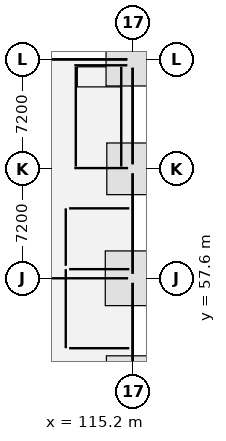
"""IFC4 building model, lengths in metres.
Left out: names, types, materials, properties, quantities, classifications, styles, units other than length and angle.
Written with IfcOpenShell. Run it as: python <this file> out.ifc"""

import sys

from ifc_helpers import new_model, si_unit, direction, frame, frame_2d, origin, origin_2d, place, context, subcontext, project, spatial, rectangle, extrude, element, fill, save


model = new_model("IFC4")
c1 = context("Model", 3, precision=1e-05, world=origin(), true_north=direction((0.0, 1.0)))
c2 = subcontext(c1, "Body", "Model", "MODEL_VIEW")
j1 = project(units=[si_unit("LENGTHUNIT", "METRE"), si_unit("PLANEANGLEUNIT", "RADIAN")], contexts=[c1])
p1 = place(None, origin())
s1 = spatial("IfcSite", under=j1, at=p1, CompositionType="ELEMENT")
p2 = place(p1, origin())
s2 = spatial("IfcBuilding", under=s1, at=p2, CompositionType="ELEMENT")
p3 = place(p2, origin())
s3 = spatial("IfcBuildingStorey", under=s2, at=p3, CompositionType="ELEMENT", Elevation=0.0)
for number, where, z_axis, x_axis in (
    (1, (115.2, 57.6, 0.0), (0.0, 0.0, 1.0), (1.0, 0.0, 0.0)),
    (2, (115.2, 64.8, 0.0), (0.0, 0.0, 1.0), (1.0, 0.0, 0.0)),
):
    element("IfcColumn", number, at=place(p3, frame(where, z_axis=z_axis, x_axis=x_axis)), inside=s3, PredefinedType="COLUMN", context=c2, shape_type="SweptSolid", body=[
        extrude(rectangle(XDim=0.6, YDim=0.6, at=origin_2d()), origin(), (0.0, 0.0, 1.0), 5.4),
    ])
p4 = place(p3, frame((115.2, 72.0, 0.0), z_axis=(0.0, 0.0, 1.0), x_axis=(1.0, 0.0, 0.0)))
e3 = element("IfcColumn", 3, at=p4, inside=s3, PredefinedType="PILASTER", context=c2, shape_type="SweptSolid", body=[
    extrude(rectangle(XDim=0.7, YDim=1.1, at=origin_2d()), origin(), (0.0, 0.0, 1.0), 5.4),
])
p5 = place(p3, frame((111.36, 64.85, 0.0), z_axis=(0.0, 0.0, 1.0), x_axis=(1.0, 0.0, 0.0)))
e4 = element("IfcWall", 4, at=p5, inside=s3, PredefinedType="SHEAR", context=c2, shape_type="SweptSolid", body=[
    extrude(rectangle(XDim=3.54, YDim=0.2, at=frame_2d((1.77, 0.0))), origin(), (0.0, 0.0, 1.0), 4.95),
])
p6 = place(p5, frame((1.22, 0.0, 0.0)))
e5 = element("IfcOpeningElement", 5, at=p6, cuts=e4, PredefinedType="OPENING", context=c2, shape_type="SweptSolid", body=[
    extrude(rectangle(XDim=1.1, YDim=2.15, at=frame_2d((0.55, 1.075))), frame((0.0, 0.112, 0.0), z_axis=(0.0, -1.0, 0.0), x_axis=(1.0, 0.0, 0.0)), (0.0, 0.0, 1.0), 0.224),
])
p7 = place(p3, frame((111.36, 71.61, 0.0), z_axis=(0.0, 0.0, 1.0), x_axis=(1.0, 0.0, 0.0)))
e6 = element("IfcWall", 6, at=p7, inside=s3, PredefinedType="SHEAR", context=c2, shape_type="SweptSolid", body=[
    extrude(rectangle(XDim=3.49, YDim=0.2, at=frame_2d((1.745, 0.0))), origin(), (0.0, 0.0, 1.0), 4.95),
])
for number, where, z_axis, x_axis in (
    (7, (111.46, 64.95, 0.0), (0.0, 0.0, 1.0), (0.0, 1.0, 0.0)),
    (8, (114.45, 64.95, 0.0), (0.0, 0.0, 1.0), (0.0, 1.0, 0.0)),
):
    element("IfcWall", number, at=place(p3, frame(where, z_axis=z_axis, x_axis=x_axis)), inside=s3, PredefinedType="SHEAR", context=c2, shape_type="SweptSolid", body=[
        extrude(rectangle(XDim=6.56, YDim=0.2, at=frame_2d((3.28, 0.0))), origin(), (0.0, 0.0, 1.0), 4.95),
    ])
p8 = place(p3, frame((115.2, 50.7, 0.0), z_axis=(0.0, 0.0, 1.0), x_axis=(0.0, 1.0, 0.0)))
e9 = element("IfcWall", 9, at=p8, inside=s3, PredefinedType="ELEMENTEDWALL", context=c2, shape_type="SweptSolid", body=[
    extrude(rectangle(XDim=6.6, YDim=0.32, at=frame_2d((3.3, 0.0))), origin(), (0.0, 0.0, 1.0), 4.29),
])
p9 = place(p8, frame((0.2, 0.0, 0.0)))
e10 = element("IfcOpeningElement", 10, at=p9, cuts=e9, PredefinedType="OPENING", context=c2, shape_type="SweptSolid", body=[
    extrude(rectangle(XDim=1.1, YDim=2.15, at=frame_2d((0.55, 1.075))), frame((0.0, 0.172, 0.0), z_axis=(0.0, -1.0, 0.0), x_axis=(1.0, 0.0, 0.0)), (0.0, 0.0, 1.0), 0.344),
])
p10 = place(p3, frame((115.2, 57.9, 0.0), z_axis=(0.0, 0.0, 1.0), x_axis=(0.0, 1.0, 0.0)))
e11 = element("IfcWall", 11, at=p10, inside=s3, PredefinedType="ELEMENTEDWALL", context=c2, shape_type="SweptSolid", body=[
    extrude(rectangle(XDim=6.6, YDim=0.32, at=frame_2d((3.3, 0.0))), origin(), (0.0, 0.0, 1.0), 4.34),
])
p11 = place(p10, frame((2.85, 0.0, 0.85)))
e12 = element("IfcOpeningElement", 12, at=p11, cuts=e11, PredefinedType="OPENING", context=c2, shape_type="SweptSolid", body=[
    extrude(rectangle(XDim=0.9, YDim=2.0, at=frame_2d((0.45, 1.0))), frame((0.0, 0.172, 0.0), z_axis=(0.0, -1.0, 0.0), x_axis=(1.0, 0.0, 0.0)), (0.0, 0.0, 1.0), 0.344),
])
p12 = place(p10, frame((5.3, 0.0, 0.0)))
e13 = element("IfcOpeningElement", 13, at=p12, cuts=e11, PredefinedType="OPENING", context=c2, shape_type="SweptSolid", body=[
    extrude(rectangle(XDim=1.1, YDim=2.15, at=frame_2d((0.55, 1.075))), frame((0.0, 0.172, 0.0), z_axis=(0.0, -1.0, 0.0), x_axis=(1.0, 0.0, 0.0)), (0.0, 0.0, 1.0), 0.344),
])
p13 = place(p3, frame((115.2, 65.1, 0.0), z_axis=(0.0, 0.0, 1.0), x_axis=(0.0, 1.0, 0.0)))
e14 = element("IfcWall", 14, at=p13, inside=s3, PredefinedType="ELEMENTEDWALL", context=c2, shape_type="SweptSolid", body=[
    extrude(rectangle(XDim=6.35, YDim=0.32, at=frame_2d((3.175, 0.0))), origin(), (0.0, 0.0, 1.0), 4.29),
])
p14 = place(p13, frame((2.5, 0.0, 0.85)))
e15 = element("IfcOpeningElement", 15, at=p14, cuts=e14, PredefinedType="OPENING", context=c2, shape_type="SweptSolid", body=[
    extrude(rectangle(XDim=1.35, YDim=2.0, at=frame_2d((0.675, 1.0))), frame((0.0, 0.172, 0.0), z_axis=(0.0, -1.0, 0.0), x_axis=(1.0, 0.0, 0.0)), (0.0, 0.0, 1.0), 0.344),
])
p15 = place(p3, frame((114.85, 72.0, 0.0), z_axis=(0.0, 0.0, 1.0), x_axis=(-1.0, 0.0, 0.0)))
e16 = element("IfcWall", 16, at=p15, inside=s3, PredefinedType="ELEMENTEDWALL", context=c2, shape_type="SweptSolid", body=[
    extrude(rectangle(XDim=6.5, YDim=0.32, at=frame_2d((3.25, 0.0))), origin(), (0.0, 0.0, 1.0), 4.29),
])
p16 = place(p3, frame((110.8, 53.0, 0.0), z_axis=(0.0, 0.0, 1.0), x_axis=(0.0, 1.0, 0.0)))
e17 = element("IfcWall", 17, at=p16, inside=s3, PredefinedType="PARTITIONING", context=c2, shape_type="SweptSolid", body=[
    extrude(rectangle(XDim=5.2, YDim=0.12, at=frame_2d((2.6, 0.0))), origin(), (0.0, 0.0, 1.0), 3.438),
])
p17 = place(p16, frame((2.1, 0.0, 0.0)))
e18 = element("IfcOpeningElement", 18, at=p17, cuts=e17, PredefinedType="OPENING", context=c2, shape_type="SweptSolid", body=[
    extrude(rectangle(XDim=1.0, YDim=2.15, at=frame_2d((0.5, 1.075))), frame((0.0, 0.072, 0.0), z_axis=(0.0, -1.0, 0.0), x_axis=(1.0, 0.0, 0.0)), (0.0, 0.0, 1.0), 0.144),
])
for number, where, z_axis, x_axis in (
    (19, (111.02, 53.0, 0.0), (0.0, 0.0, 1.0), (1.0, 0.0, 0.0)),
    (20, (111.02, 58.2, 0.0), (0.0, 0.0, 1.0), (1.0, 0.0, 0.0)),
):
    element("IfcWall", number, at=place(p3, frame(where, z_axis=z_axis, x_axis=x_axis)), inside=s3, PredefinedType="PARTITIONING", context=c2, shape_type="SweptSolid", body=[
        extrude(rectangle(XDim=3.96, YDim=0.12, at=frame_2d((1.98, 0.0))), origin(), (0.0, 0.0, 1.0), 4.942),
    ])
p18 = place(p3, frame((110.8, 58.42, 0.0), z_axis=(0.0, 0.0, 1.0), x_axis=(0.0, 1.0, 0.0)))
e21 = element("IfcWall", 21, at=p18, inside=s3, PredefinedType="PLUMBINGWALL", context=c2, shape_type="SweptSolid", body=[
    extrude(rectangle(XDim=3.78, YDim=0.18, at=frame_2d((1.89, 0.0))), origin(), (0.0, 0.0, 1.0), 4.942),
])
p19 = place(p18, frame((1.44, 0.0, 0.0)))
e22 = element("IfcOpeningElement", 22, at=p19, cuts=e21, PredefinedType="OPENING", context=c2, shape_type="SweptSolid", body=[
    extrude(rectangle(XDim=0.9, YDim=2.1, at=frame_2d((0.45, 1.05))), frame((0.0, 0.102, 0.0), z_axis=(0.0, -1.0, 0.0), x_axis=(1.0, 0.0, 0.0)), (0.0, 0.0, 1.0), 0.204),
])
p20 = place(p3, frame((111.02, 62.2, 0.0), z_axis=(0.0, 0.0, 1.0), x_axis=(1.0, 0.0, 0.0)))
e23 = element("IfcWall", 23, at=p20, inside=s3, PredefinedType="PLUMBINGWALL", context=c2, shape_type="SweptSolid", body=[
    extrude(rectangle(XDim=3.96, YDim=0.18, at=frame_2d((1.98, 0.0))), origin(), (0.0, 0.0, 1.0), 4.942),
])
p21 = place(p11, origin())
e24 = element("IfcWindow", 24, at=p21, inside=s3, PartitioningType="SINGLE_PANEL", PredefinedType="WINDOW", context=c2, shape_type="SweptSolid", body=[
    extrude(rectangle(XDim=0.9, YDim=2.0, at=frame_2d((0.45, 1.0))), frame((0.0, 0.03, 0.0), z_axis=(0.0, -1.0, 0.0), x_axis=(1.0, 0.0, 0.0)), (0.0, 0.0, 1.0), 0.06),
])
fill(e12, e24)
p22 = place(p14, origin())
e25 = element("IfcWindow", 25, at=p22, inside=s3, PartitioningType="SINGLE_PANEL", PredefinedType="WINDOW", context=c2, shape_type="SweptSolid", body=[
    extrude(rectangle(XDim=1.35, YDim=2.0, at=frame_2d((0.675, 1.0))), frame((0.0, 0.03, 0.0), z_axis=(0.0, -1.0, 0.0), x_axis=(1.0, 0.0, 0.0)), (0.0, 0.0, 1.0), 0.06),
])
fill(e15, e25)
p23 = place(p12, frame((1.1, 0.0, 0.0), z_axis=(0.0, 0.0, 1.0), x_axis=(-1.0, 0.0, 0.0)))
e26 = element("IfcDoor", 26, at=p23, inside=s3, OperationType="SINGLE_SWING_RIGHT", PredefinedType="DOOR", context=c2, shape_type="SweptSolid", body=[
    extrude(rectangle(XDim=1.1, YDim=2.15, at=frame_2d((0.55, 1.075))), frame((0.0, 0.025, 0.0), z_axis=(0.0, -1.0, 0.0), x_axis=(1.0, 0.0, 0.0)), (0.0, 0.0, 1.0), 0.05),
])
fill(e13, e26)
p24 = place(p6, frame((1.1, 0.0, 0.0), z_axis=(0.0, 0.0, 1.0), x_axis=(-1.0, 0.0, 0.0)))
e27 = element("IfcDoor", 27, at=p24, inside=s3, OperationType="SINGLE_SWING_LEFT", PredefinedType="DOOR", context=c2, shape_type="SweptSolid", body=[
    extrude(rectangle(XDim=1.1, YDim=2.15, at=frame_2d((0.55, 1.075))), frame((0.0, 0.025, 0.0), z_axis=(0.0, -1.0, 0.0), x_axis=(1.0, 0.0, 0.0)), (0.0, 0.0, 1.0), 0.05),
])
fill(e5, e27)
p25 = place(p17, origin())
e28 = element("IfcDoor", 28, at=p25, inside=s3, OperationType="SINGLE_SWING_LEFT", PredefinedType="DOOR", context=c2, shape_type="SweptSolid", body=[
    extrude(rectangle(XDim=1.0, YDim=2.15, at=frame_2d((0.5, 1.075))), frame((0.0, 0.025, 0.0), z_axis=(0.0, -1.0, 0.0), x_axis=(1.0, 0.0, 0.0)), (0.0, 0.0, 1.0), 0.05),
])
fill(e18, e28)
p26 = place(p19, origin())
e29 = element("IfcDoor", 29, at=p26, inside=s3, OperationType="SINGLE_SWING_RIGHT", PredefinedType="DOOR", context=c2, shape_type="SweptSolid", body=[
    extrude(rectangle(XDim=0.9, YDim=2.1, at=frame_2d((0.45, 1.05))), frame((0.0, 0.025, 0.0), z_axis=(0.0, -1.0, 0.0), x_axis=(1.0, 0.0, 0.0)), (0.0, 0.0, 1.0), 0.05),
])
fill(e22, e29)
save(model, sys.argv[1])
